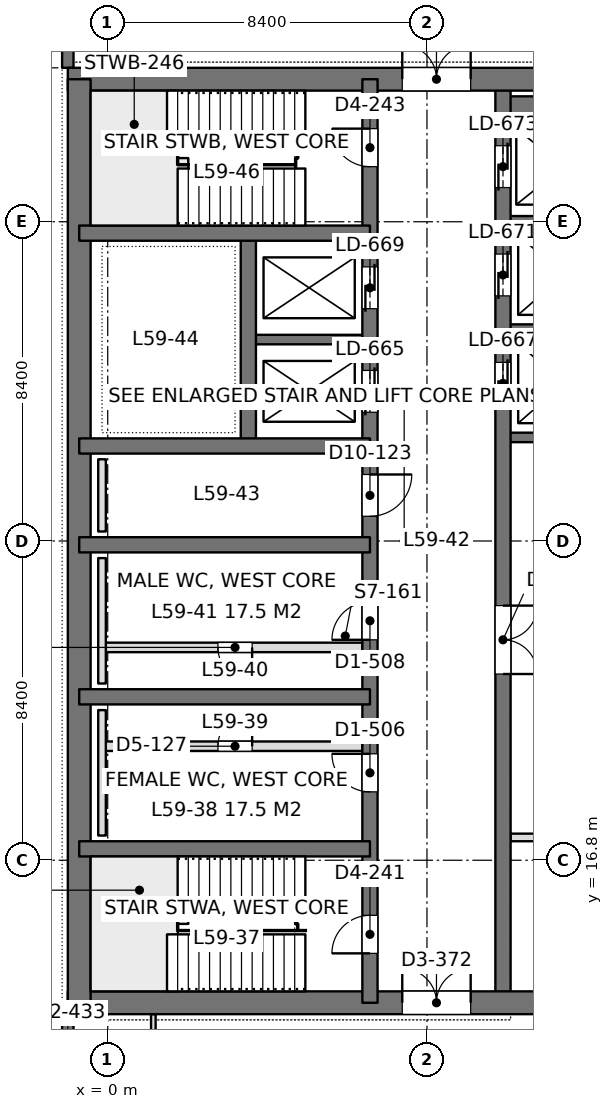
"""IFC4 building model, lengths in metres.
Left out: names, types, materials, properties, quantities, classifications, styles, units other than length and angle.
Written with IfcOpenShell. Run it as: python <this file> out.ifc"""

import sys

from ifc_helpers import new_model, si_unit, direction, frame, frame_2d, origin, place, context, subcontext, project, spatial, rectangle, extrude, element, fill, save


model = new_model("IFC4")
c1 = context("Model", 3, precision=1e-05, world=origin(), true_north=direction((0.0, 1.0)))
c2 = subcontext(c1, "Body", "Model", "MODEL_VIEW")
j1 = project(units=[si_unit("LENGTHUNIT", "METRE"), si_unit("PLANEANGLEUNIT", "RADIAN")], contexts=[c1])
p1 = place(None, origin())
s1 = spatial("IfcSite", under=j1, at=p1, CompositionType="ELEMENT")
p2 = place(p1, origin())
s2 = spatial("IfcBuilding", under=s1, at=p2, CompositionType="ELEMENT")
p3 = place(p2, frame((0.0, 0.0, 259.2)))
s3 = spatial("IfcBuildingStorey", under=s2, at=p3, CompositionType="ELEMENT", Elevation=259.2)
p4 = place(p3, frame((-1.05, 13.05, 0.0), z_axis=(0.0, 0.0, 1.0), x_axis=(1.0, 0.0, 0.0)))
e1 = element("IfcWall", 1, at=p4, inside=s3, PredefinedType="SHEAR", context=c2, shape_type="SweptSolid", body=[
    extrude(rectangle(XDim=17.7, YDim=0.6, at=frame_2d((8.85, 0.0))), origin(), (0.0, 0.0, 1.0), 4.5),
])
p5 = place(p4, frame((8.8, 0.0, 0.0)))
e2 = element("IfcOpeningElement", 2, at=p5, cuts=e1, PredefinedType="OPENING", context=c2, shape_type="SweptSolid", body=[
    extrude(rectangle(XDim=1.8, YDim=2.4, at=frame_2d((0.9, 1.2))), frame((0.0, 0.31, 0.0), z_axis=(0.0, -1.0, 0.0), x_axis=(1.0, 0.0, 0.0)), (0.0, 0.0, 1.0), 0.62),
])
p6 = place(p3, frame((-1.05, 37.35, 0.0), z_axis=(0.0, 0.0, 1.0), x_axis=(1.0, 0.0, 0.0)))
e3 = element("IfcWall", 3, at=p6, inside=s3, PredefinedType="SHEAR", context=c2, shape_type="SweptSolid", body=[
    extrude(rectangle(XDim=17.7, YDim=0.6, at=frame_2d((8.85, 0.0))), origin(), (0.0, 0.0, 1.0), 4.5),
])
p7 = place(p6, frame((8.8, 0.0, 0.0)))
e4 = element("IfcOpeningElement", 4, at=p7, cuts=e3, PredefinedType="OPENING", context=c2, shape_type="SweptSolid", body=[
    extrude(rectangle(XDim=1.8, YDim=2.4, at=frame_2d((0.9, 1.2))), frame((0.0, 0.31, 0.0), z_axis=(0.0, -1.0, 0.0), x_axis=(1.0, 0.0, 0.0)), (0.0, 0.0, 1.0), 0.62),
])
p8 = place(p3, frame((-0.75, 13.05, 0.0), z_axis=(0.0, 0.0, 1.0), x_axis=(0.0, 1.0, 0.0)))
e5 = element("IfcWall", 5, at=p8, inside=s3, PredefinedType="SHEAR", context=c2, shape_type="SweptSolid", body=[
    extrude(rectangle(XDim=24.3, YDim=0.6, at=frame_2d((12.15, 0.0))), origin(), (0.0, 0.0, 1.0), 4.5),
])
p9 = place(p3, frame((6.9, 13.05, 0.0), z_axis=(0.0, 0.0, 1.0), x_axis=(0.0, 1.0, 0.0)))
e6 = element("IfcWall", 6, at=p9, inside=s3, PredefinedType="SHEAR", context=c2, shape_type="SweptSolid", body=[
    extrude(rectangle(XDim=24.3, YDim=0.4, at=frame_2d((12.15, 0.0))), origin(), (0.0, 0.0, 1.0), 4.5),
])
p10 = place(p9, frame((1.3, 0.0, 0.0)))
e7 = element("IfcOpeningElement", 7, at=p10, cuts=e6, PredefinedType="OPENING", context=c2, shape_type="SweptSolid", body=[
    extrude(rectangle(XDim=1.0, YDim=2.2, at=frame_2d((0.5, 1.1))), frame((0.0, 0.21, 0.0), z_axis=(0.0, -1.0, 0.0), x_axis=(1.0, 0.0, 0.0)), (0.0, 0.0, 1.0), 0.42),
])
p11 = place(p9, frame((22.0, 0.0, 0.0)))
e8 = element("IfcOpeningElement", 8, at=p11, cuts=e6, PredefinedType="OPENING", context=c2, shape_type="SweptSolid", body=[
    extrude(rectangle(XDim=1.0, YDim=2.2, at=frame_2d((0.5, 1.1))), frame((0.0, 0.21, 0.0), z_axis=(0.0, -1.0, 0.0), x_axis=(1.0, 0.0, 0.0)), (0.0, 0.0, 1.0), 0.42),
])
p12 = place(p9, frame((5.55, 0.0, 0.0)))
e9 = element("IfcOpeningElement", 9, at=p12, cuts=e6, PredefinedType="OPENING", context=c2, shape_type="SweptSolid", body=[
    extrude(rectangle(XDim=1.0, YDim=2.2, at=frame_2d((0.5, 1.1))), frame((0.0, 0.21, 0.0), z_axis=(0.0, -1.0, 0.0), x_axis=(1.0, 0.0, 0.0)), (0.0, 0.0, 1.0), 0.42),
])
p13 = place(p9, frame((9.55, 0.0, 0.0)))
e10 = element("IfcOpeningElement", 10, at=p13, cuts=e6, PredefinedType="OPENING", context=c2, shape_type="SweptSolid", body=[
    extrude(rectangle(XDim=1.0, YDim=2.2, at=frame_2d((0.5, 1.1))), frame((0.0, 0.21, 0.0), z_axis=(0.0, -1.0, 0.0), x_axis=(1.0, 0.0, 0.0)), (0.0, 0.0, 1.0), 0.42),
])
p14 = place(p9, frame((12.8, 0.0, 0.0)))
e11 = element("IfcOpeningElement", 11, at=p14, cuts=e6, PredefinedType="OPENING", context=c2, shape_type="SweptSolid", body=[
    extrude(rectangle(XDim=1.1, YDim=2.2, at=frame_2d((0.55, 1.1))), frame((0.0, 0.21, 0.0), z_axis=(0.0, -1.0, 0.0), x_axis=(1.0, 0.0, 0.0)), (0.0, 0.0, 1.0), 0.42),
])
p15 = place(p9, frame((15.538, 0.0, 0.0)))
e12 = element("IfcOpeningElement", 12, at=p15, cuts=e6, PredefinedType="OPENING", context=c2, shape_type="SweptSolid", body=[
    extrude(rectangle(XDim=1.1, YDim=2.2, at=frame_2d((0.55, 1.1))), frame((0.0, 0.21, 0.0), z_axis=(0.0, -1.0, 0.0), x_axis=(1.0, 0.0, 0.0)), (0.0, 0.0, 1.0), 0.42),
])
p16 = place(p9, frame((18.262, 0.0, 0.0)))
e13 = element("IfcOpeningElement", 13, at=p16, cuts=e6, PredefinedType="OPENING", context=c2, shape_type="SweptSolid", body=[
    extrude(rectangle(XDim=1.1, YDim=2.2, at=frame_2d((0.55, 1.1))), frame((0.0, 0.21, 0.0), z_axis=(0.0, -1.0, 0.0), x_axis=(1.0, 0.0, 0.0)), (0.0, 0.0, 1.0), 0.42),
])
p17 = place(p3, frame((10.4, 13.05, 0.0), z_axis=(0.0, 0.0, 1.0), x_axis=(0.0, 1.0, 0.0)))
e14 = element("IfcWall", 14, at=p17, inside=s3, PredefinedType="SHEAR", context=c2, shape_type="SweptSolid", body=[
    extrude(rectangle(XDim=24.3, YDim=0.4, at=frame_2d((12.15, 0.0))), origin(), (0.0, 0.0, 1.0), 4.5),
])
p18 = place(p17, frame((15.75, 0.0, 0.0)))
e15 = element("IfcOpeningElement", 15, at=p18, cuts=e14, PredefinedType="OPENING", context=c2, shape_type="SweptSolid", body=[
    extrude(rectangle(XDim=1.1, YDim=2.2, at=frame_2d((0.55, 1.1))), frame((0.0, 0.21, 0.0), z_axis=(0.0, -1.0, 0.0), x_axis=(1.0, 0.0, 0.0)), (0.0, 0.0, 1.0), 0.42),
])
p19 = place(p17, frame((18.6, 0.0, 0.0)))
e16 = element("IfcOpeningElement", 16, at=p19, cuts=e14, PredefinedType="OPENING", context=c2, shape_type="SweptSolid", body=[
    extrude(rectangle(XDim=1.1, YDim=2.2, at=frame_2d((0.55, 1.1))), frame((0.0, 0.21, 0.0), z_axis=(0.0, -1.0, 0.0), x_axis=(1.0, 0.0, 0.0)), (0.0, 0.0, 1.0), 0.42),
])
p20 = place(p17, frame((21.45, 0.0, 0.0)))
e17 = element("IfcOpeningElement", 17, at=p20, cuts=e14, PredefinedType="OPENING", context=c2, shape_type="SweptSolid", body=[
    extrude(rectangle(XDim=1.1, YDim=2.2, at=frame_2d((0.55, 1.1))), frame((0.0, 0.21, 0.0), z_axis=(0.0, -1.0, 0.0), x_axis=(1.0, 0.0, 0.0)), (0.0, 0.0, 1.0), 0.42),
])
p21 = place(p17, frame((8.65, 0.0, 0.0)))
e18 = element("IfcOpeningElement", 18, at=p21, cuts=e14, PredefinedType="OPENING", context=c2, shape_type="SweptSolid", body=[
    extrude(rectangle(XDim=1.8, YDim=2.4, at=frame_2d((0.9, 1.2))), frame((0.0, 0.21, 0.0), z_axis=(0.0, -1.0, 0.0), x_axis=(1.0, 0.0, 0.0)), (0.0, 0.0, 1.0), 0.42),
])
for number, where, z_axis, x_axis in (
    (19, (-0.75, 17.1, 0.0), (0.0, 0.0, 1.0), (1.0, 0.0, 0.0)),
    (20, (-0.75, 21.1, 0.0), (0.0, 0.0, 1.0), (1.0, 0.0, 0.0)),
    (21, (-0.75, 25.1, 0.0), (0.0, 0.0, 1.0), (1.0, 0.0, 0.0)),
    (22, (-0.75, 27.7, 0.0), (0.0, 0.0, 1.0), (1.0, 0.0, 0.0)),
    (23, (-0.75, 33.3, 0.0), (0.0, 0.0, 1.0), (1.0, 0.0, 0.0)),
):
    element("IfcWall", number, at=place(p3, frame(where, z_axis=z_axis, x_axis=x_axis)), inside=s3, PredefinedType="SHEAR", context=c2, shape_type="SweptSolid", body=[
        extrude(rectangle(XDim=7.65, YDim=0.4, at=frame_2d((3.825, 0.0))), origin(), (0.0, 0.0, 1.0), 4.5),
    ])
p22 = place(p3, frame((3.7, 27.7, 0.0), z_axis=(0.0, 0.0, 1.0), x_axis=(0.0, 1.0, 0.0)))
e24 = element("IfcWall", 24, at=p22, inside=s3, PredefinedType="SHEAR", context=c2, shape_type="SweptSolid", body=[
    extrude(rectangle(XDim=5.6, YDim=0.4, at=frame_2d((2.8, 0.0))), origin(), (0.0, 0.0, 1.0), 4.5),
])
p23 = place(p3, frame((3.7, 30.5, 0.0), z_axis=(0.0, 0.0, 1.0), x_axis=(1.0, 0.0, 0.0)))
e25 = element("IfcWall", 25, at=p23, inside=s3, PredefinedType="SHEAR", context=c2, shape_type="SweptSolid", body=[
    extrude(rectangle(XDim=3.2, YDim=0.25, at=frame_2d((1.6, 0.0))), origin(), (0.0, 0.0, 1.0), 4.5),
])
p24 = place(p3, frame((10.4, 27.925, 0.0), z_axis=(0.0, 0.0, 1.0), x_axis=(1.0, 0.0, 0.0)))
e26 = element("IfcWall", 26, at=p24, inside=s3, PredefinedType="SHEAR", context=c2, shape_type="SweptSolid", body=[
    extrude(rectangle(XDim=5.95, YDim=0.25, at=frame_2d((2.975, 0.0))), origin(), (0.0, 0.0, 1.0), 4.5),
])
for number, where, z_axis, x_axis in (
    (27, (10.4, 30.775, 0.0), (0.0, 0.0, 1.0), (1.0, 0.0, 0.0)),
    (28, (10.4, 33.625, 0.0), (0.0, 0.0, 1.0), (1.0, 0.0, 0.0)),
):
    element("IfcWall", number, at=place(p3, frame(where, z_axis=z_axis, x_axis=x_axis)), inside=s3, PredefinedType="SHEAR", context=c2, shape_type="SweptSolid", body=[
        extrude(rectangle(XDim=3.2, YDim=0.25, at=frame_2d((1.6, 0.0))), origin(), (0.0, 0.0, 1.0), 4.5),
    ])
p25 = place(p3, frame((10.4, 36.625, 0.0), z_axis=(0.0, 0.0, 1.0), x_axis=(1.0, 0.0, 0.0)))
e29 = element("IfcWall", 29, at=p25, inside=s3, PredefinedType="SHEAR", context=c2, shape_type="SweptSolid", body=[
    extrude(rectangle(XDim=3.2, YDim=0.55, at=frame_2d((1.6, 0.0))), origin(), (0.0, 0.0, 1.0), 4.5),
])
p26 = place(p3, frame((-1.05, 8.4, 0.0), z_axis=(0.0, 0.0, 1.0), x_axis=(0.0, 1.0, 0.0)))
e30 = element("IfcWall", 30, at=p26, inside=s3, PredefinedType="SOLIDWALL", context=c2, shape_type="SweptSolid", body=[
    extrude(rectangle(XDim=4.35, YDim=0.3, at=frame_2d((2.175, 0.0))), origin(), (0.0, 0.0, 1.0), 4.35),
])
p27 = place(p26, frame((0.975, 0.0, 0.9)))
e31 = element("IfcOpeningElement", 31, at=p27, cuts=e30, PredefinedType="OPENING", context=c2, shape_type="SweptSolid", body=[
    extrude(rectangle(XDim=2.4, YDim=1.9, at=frame_2d((1.2, 0.95))), frame((0.0, 0.16, 0.0), z_axis=(0.0, -1.0, 0.0), x_axis=(1.0, 0.0, 0.0)), (0.0, 0.0, 1.0), 0.32),
])
p28 = place(p3, frame((-1.05, 37.65, 0.0), z_axis=(0.0, 0.0, 1.0), x_axis=(0.0, 1.0, 0.0)))
e32 = element("IfcWall", 32, at=p28, inside=s3, PredefinedType="SOLIDWALL", context=c2, shape_type="SweptSolid", body=[
    extrude(rectangle(XDim=4.35, YDim=0.3, at=frame_2d((2.175, 0.0))), origin(), (0.0, 0.0, 1.0), 4.35),
])
p29 = place(p28, frame((0.975, 0.0, 0.9)))
e33 = element("IfcOpeningElement", 33, at=p29, cuts=e32, PredefinedType="OPENING", context=c2, shape_type="SweptSolid", body=[
    extrude(rectangle(XDim=2.4, YDim=1.9, at=frame_2d((1.2, 0.95))), frame((0.0, 0.16, 0.0), z_axis=(0.0, -1.0, 0.0), x_axis=(1.0, 0.0, 0.0)), (0.0, 0.0, 1.0), 0.32),
])
p30 = place(p3, frame((10.598, 17.4, 0.0), z_axis=(0.0, 0.0, 1.0), x_axis=(1.0, 0.0, 0.0)))
e34 = element("IfcWall", 34, at=p30, inside=s3, PredefinedType="PARTITIONING", context=c2, shape_type="SweptSolid", body=[
    extrude(rectangle(XDim=5.904, YDim=0.2, at=frame_2d((2.952, 0.0))), origin(), (0.0, 0.0, 1.0), 3.8),
])
p31 = place(p3, frame((1.2, 10.8, 0.0), z_axis=(0.0, 0.0, 1.0), x_axis=(0.0, 1.0, 0.0)))
e35 = element("IfcWall", 35, at=p31, inside=s3, PredefinedType="PARTITIONING", context=c2, shape_type="SweptSolid", body=[
    extrude(rectangle(XDim=1.952, YDim=0.12, at=frame_2d((0.976, 0.0))), origin(), (0.0, 0.0, 1.0), 4.35),
])
p32 = place(p3, frame((1.2, 37.648, 0.0), z_axis=(0.0, 0.0, 1.0), x_axis=(0.0, 1.0, 0.0)))
e36 = element("IfcWall", 36, at=p32, inside=s3, PredefinedType="PARTITIONING", context=c2, shape_type="SweptSolid", body=[
    extrude(rectangle(XDim=1.952, YDim=0.12, at=frame_2d((0.976, 0.0))), origin(), (0.0, 0.0, 1.0), 4.35),
])
p33 = place(p3, frame((-0.05, 22.4, 0.0), z_axis=(0.0, 0.0, 1.0), x_axis=(1.0, 0.0, 0.0)))
e37 = element("IfcWall", 37, at=p33, inside=s3, PredefinedType="PARTITIONING", context=c2, shape_type="SweptSolid", body=[
    extrude(rectangle(XDim=6.75, YDim=0.25, at=frame_2d((3.375, 0.0))), origin(), (0.0, 0.0, 1.0), 4.3),
])
p34 = place(p33, frame((2.95, 0.0, 0.0)))
e38 = element("IfcOpeningElement", 38, at=p34, cuts=e37, PredefinedType="OPENING", context=c2, shape_type="SweptSolid", body=[
    extrude(rectangle(XDim=0.9, YDim=2.2, at=frame_2d((0.45, 1.1))), frame((0.0, 0.135, 0.0), z_axis=(0.0, -1.0, 0.0), x_axis=(1.0, 0.0, 0.0)), (0.0, 0.0, 1.0), 0.27),
])
p35 = place(p3, frame((-0.05, 19.8, 0.0), z_axis=(0.0, 0.0, 1.0), x_axis=(1.0, 0.0, 0.0)))
e39 = element("IfcWall", 39, at=p35, inside=s3, PredefinedType="PARTITIONING", context=c2, shape_type="SweptSolid", body=[
    extrude(rectangle(XDim=6.75, YDim=0.25, at=frame_2d((3.375, 0.0))), origin(), (0.0, 0.0, 1.0), 4.3),
])
p36 = place(p35, frame((2.95, 0.0, 0.0)))
e40 = element("IfcOpeningElement", 40, at=p36, cuts=e39, PredefinedType="OPENING", context=c2, shape_type="SweptSolid", body=[
    extrude(rectangle(XDim=0.9, YDim=2.2, at=frame_2d((0.45, 1.1))), frame((0.0, 0.135, 0.0), z_axis=(0.0, -1.0, 0.0), x_axis=(1.0, 0.0, 0.0)), (0.0, 0.0, 1.0), 0.27),
])
for number, where, z_axis, x_axis in (
    (41, (-0.15, 17.45, 0.0), (0.0, 0.0, 1.0), (0.0, 1.0, 0.0)),
    (42, (-0.15, 21.45, 0.0), (0.0, 0.0, 1.0), (0.0, 1.0, 0.0)),
):
    element("IfcWall", number, at=place(p3, frame(where, z_axis=z_axis, x_axis=x_axis)), inside=s3, PredefinedType="PLUMBINGWALL", context=c2, shape_type="SweptSolid", body=[
        extrude(rectangle(XDim=3.3, YDim=0.2, at=frame_2d((1.65, 0.0))), origin(), (0.0, 0.0, 1.0), 1.2),
    ])
p37 = place(p3, frame((-0.15, 25.45, 0.0), z_axis=(0.0, 0.0, 1.0), x_axis=(0.0, 1.0, 0.0)))
e43 = element("IfcWall", 43, at=p37, inside=s3, PredefinedType="PLUMBINGWALL", context=c2, shape_type="SweptSolid", body=[
    extrude(rectangle(XDim=1.9, YDim=0.2, at=frame_2d((0.95, 0.0))), origin(), (0.0, 0.0, 1.0), 1.2),
])
p38 = place(p5, origin())
e44 = element("IfcDoor", 44, at=p38, inside=s3, OperationType="DOUBLE_DOOR_SINGLE_SWING", PredefinedType="DOOR", context=c2, shape_type="SweptSolid", body=[
    extrude(rectangle(XDim=1.8, YDim=2.4, at=frame_2d((0.9, 1.2))), frame((0.0, 0.025, 0.0), z_axis=(0.0, -1.0, 0.0), x_axis=(1.0, 0.0, 0.0)), (0.0, 0.0, 1.0), 0.05),
])
fill(e2, e44)
p39 = place(p7, origin())
e45 = element("IfcDoor", 45, at=p39, inside=s3, OperationType="DOUBLE_DOOR_SINGLE_SWING", PredefinedType="DOOR", context=c2, shape_type="SweptSolid", body=[
    extrude(rectangle(XDim=1.8, YDim=2.4, at=frame_2d((0.9, 1.2))), frame((0.0, 0.025, 0.0), z_axis=(0.0, -1.0, 0.0), x_axis=(1.0, 0.0, 0.0)), (0.0, 0.0, 1.0), 0.05),
])
fill(e4, e45)
p40 = place(p10, origin())
e46 = element("IfcDoor", 46, at=p40, inside=s3, OperationType="SINGLE_SWING_LEFT", PredefinedType="DOOR", context=c2, shape_type="SweptSolid", body=[
    extrude(rectangle(XDim=1.0, YDim=2.2, at=frame_2d((0.5, 1.1))), frame((0.0, 0.025, 0.0), z_axis=(0.0, -1.0, 0.0), x_axis=(1.0, 0.0, 0.0)), (0.0, 0.0, 1.0), 0.05),
])
fill(e7, e46)
p41 = place(p11, origin())
e47 = element("IfcDoor", 47, at=p41, inside=s3, OperationType="SINGLE_SWING_RIGHT", PredefinedType="DOOR", context=c2, shape_type="SweptSolid", body=[
    extrude(rectangle(XDim=1.0, YDim=2.2, at=frame_2d((0.5, 1.1))), frame((0.0, 0.025, 0.0), z_axis=(0.0, -1.0, 0.0), x_axis=(1.0, 0.0, 0.0)), (0.0, 0.0, 1.0), 0.05),
])
fill(e8, e47)
p42 = place(p12, origin())
e48 = element("IfcDoor", 48, at=p42, inside=s3, OperationType="SINGLE_SWING_RIGHT", PredefinedType="DOOR", context=c2, shape_type="SweptSolid", body=[
    extrude(rectangle(XDim=1.0, YDim=2.2, at=frame_2d((0.5, 1.1))), frame((0.0, 0.025, 0.0), z_axis=(0.0, -1.0, 0.0), x_axis=(1.0, 0.0, 0.0)), (0.0, 0.0, 1.0), 0.05),
])
fill(e9, e48)
p43 = place(p13, origin())
e49 = element("IfcDoor", 49, at=p43, inside=s3, OperationType="SINGLE_SWING_LEFT", PredefinedType="DOOR", context=c2, shape_type="SweptSolid", body=[
    extrude(rectangle(XDim=1.0, YDim=2.2, at=frame_2d((0.5, 1.1))), frame((0.0, 0.025, 0.0), z_axis=(0.0, -1.0, 0.0), x_axis=(1.0, 0.0, 0.0)), (0.0, 0.0, 1.0), 0.05),
])
fill(e10, e49)
p44 = place(p14, frame((1.1, 0.0, 0.0), z_axis=(0.0, 0.0, 1.0), x_axis=(-1.0, 0.0, 0.0)))
e50 = element("IfcDoor", 50, at=p44, inside=s3, OperationType="SINGLE_SWING_LEFT", PredefinedType="DOOR", context=c2, shape_type="SweptSolid", body=[
    extrude(rectangle(XDim=1.1, YDim=2.2, at=frame_2d((0.55, 1.1))), frame((0.0, 0.025, 0.0), z_axis=(0.0, -1.0, 0.0), x_axis=(1.0, 0.0, 0.0)), (0.0, 0.0, 1.0), 0.05),
])
fill(e11, e50)
p45 = place(p18, origin())
e51 = element("IfcDoor", 51, at=p45, inside=s3, OperationType="DOUBLE_DOOR_SLIDING", PredefinedType="DOOR", context=c2, shape_type="SweptSolid", body=[
    extrude(rectangle(XDim=1.1, YDim=2.2, at=frame_2d((0.55, 1.1))), frame((0.0, 0.025, 0.0), z_axis=(0.0, -1.0, 0.0), x_axis=(1.0, 0.0, 0.0)), (0.0, 0.0, 1.0), 0.05),
])
fill(e15, e51)
p46 = place(p19, origin())
e52 = element("IfcDoor", 52, at=p46, inside=s3, OperationType="DOUBLE_DOOR_SLIDING", PredefinedType="DOOR", context=c2, shape_type="SweptSolid", body=[
    extrude(rectangle(XDim=1.1, YDim=2.2, at=frame_2d((0.55, 1.1))), frame((0.0, 0.025, 0.0), z_axis=(0.0, -1.0, 0.0), x_axis=(1.0, 0.0, 0.0)), (0.0, 0.0, 1.0), 0.05),
])
fill(e16, e52)
p47 = place(p20, origin())
e53 = element("IfcDoor", 53, at=p47, inside=s3, OperationType="DOUBLE_DOOR_SLIDING", PredefinedType="DOOR", context=c2, shape_type="SweptSolid", body=[
    extrude(rectangle(XDim=1.1, YDim=2.2, at=frame_2d((0.55, 1.1))), frame((0.0, 0.025, 0.0), z_axis=(0.0, -1.0, 0.0), x_axis=(1.0, 0.0, 0.0)), (0.0, 0.0, 1.0), 0.05),
])
fill(e17, e53)
p48 = place(p15, origin())
e54 = element("IfcDoor", 54, at=p48, inside=s3, OperationType="DOUBLE_DOOR_SLIDING", PredefinedType="DOOR", context=c2, shape_type="SweptSolid", body=[
    extrude(rectangle(XDim=1.1, YDim=2.2, at=frame_2d((0.55, 1.1))), frame((0.0, 0.025, 0.0), z_axis=(0.0, -1.0, 0.0), x_axis=(1.0, 0.0, 0.0)), (0.0, 0.0, 1.0), 0.05),
])
fill(e12, e54)
p49 = place(p16, origin())
e55 = element("IfcDoor", 55, at=p49, inside=s3, OperationType="DOUBLE_DOOR_SLIDING", PredefinedType="DOOR", context=c2, shape_type="SweptSolid", body=[
    extrude(rectangle(XDim=1.1, YDim=2.2, at=frame_2d((0.55, 1.1))), frame((0.0, 0.025, 0.0), z_axis=(0.0, -1.0, 0.0), x_axis=(1.0, 0.0, 0.0)), (0.0, 0.0, 1.0), 0.05),
])
fill(e13, e55)
p50 = place(p21, frame((1.8, 0.0, 0.0), z_axis=(0.0, 0.0, 1.0), x_axis=(-1.0, 0.0, 0.0)))
e56 = element("IfcDoor", 56, at=p50, inside=s3, OperationType="DOUBLE_DOOR_SINGLE_SWING", PredefinedType="DOOR", context=c2, shape_type="SweptSolid", body=[
    extrude(rectangle(XDim=1.8, YDim=2.4, at=frame_2d((0.9, 1.2))), frame((0.0, 0.025, 0.0), z_axis=(0.0, -1.0, 0.0), x_axis=(1.0, 0.0, 0.0)), (0.0, 0.0, 1.0), 0.05),
])
fill(e18, e56)
p51 = place(p34, frame((0.9, 0.0, 0.0), z_axis=(0.0, 0.0, 1.0), x_axis=(-1.0, 0.0, 0.0)))
e57 = element("IfcDoor", 57, at=p51, inside=s3, OperationType="SINGLE_SWING_LEFT", PredefinedType="DOOR", context=c2, shape_type="SweptSolid", body=[
    extrude(rectangle(XDim=0.9, YDim=2.2, at=frame_2d((0.45, 1.1))), frame((0.0, 0.025, 0.0), z_axis=(0.0, -1.0, 0.0), x_axis=(1.0, 0.0, 0.0)), (0.0, 0.0, 1.0), 0.05),
])
fill(e38, e57)
p52 = place(p36, origin())
e58 = element("IfcDoor", 58, at=p52, inside=s3, OperationType="SINGLE_SWING_RIGHT", PredefinedType="DOOR", context=c2, shape_type="SweptSolid", body=[
    extrude(rectangle(XDim=0.9, YDim=2.2, at=frame_2d((0.45, 1.1))), frame((0.0, 0.025, 0.0), z_axis=(0.0, -1.0, 0.0), x_axis=(1.0, 0.0, 0.0)), (0.0, 0.0, 1.0), 0.05),
])
fill(e40, e58)
save(model, sys.argv[1])
